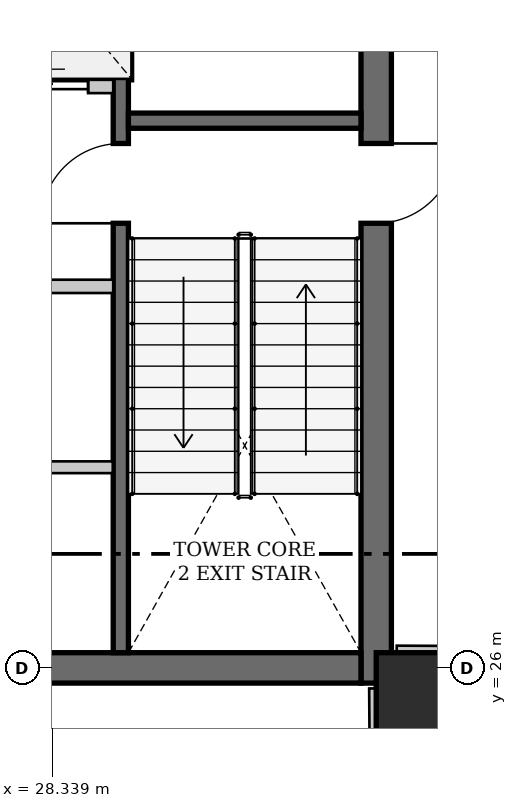
"""IFC4 building model, lengths in metres.
Left out: names, types, materials, properties, quantities, classifications, styles, units other than length and angle.
Written with IfcOpenShell. Run it as: python <this file> out.ifc"""

import sys

from ifc_helpers import new_model, si_unit, direction, frame, frame_2d, origin, origin_2d, place, context, subcontext, project, spatial, rectangle, extrude, source, transform, mapped, element, fill, save


model = new_model("IFC4")
c1 = context("Model", 3, precision=1e-05, world=origin(), true_north=direction((0.0, 1.0)))
c2 = subcontext(c1, "Body", "Model", "MODEL_VIEW")
j1 = project(units=[si_unit("LENGTHUNIT", "METRE"), si_unit("PLANEANGLEUNIT", "RADIAN")], contexts=[c1])
p1 = place(None, origin())
s1 = spatial("IfcSite", under=j1, at=p1, CompositionType="ELEMENT")
p2 = place(p1, origin())
s2 = spatial("IfcBuilding", under=s1, at=p2, CompositionType="ELEMENT")
p3 = place(p2, frame((0.0, 0.0, 84.8)))
s3 = spatial("IfcBuildingStorey", under=s2, at=p3, CompositionType="ELEMENT", Elevation=84.8)
p4 = place(p3, frame((33.3, 25.5, 0.0), z_axis=(0.0, 0.0, 1.0), x_axis=(1.0, 0.0, 0.0)))
e1 = element("IfcColumn", 1, at=p4, inside=s3, PredefinedType="COLUMN", context=c2, shape_type="SweptSolid", body=[
    extrude(rectangle(XDim=1.4, YDim=1.4, at=origin_2d()), origin(), (0.0, 0.0, 1.0), 4.15),
])
p5 = place(p3, frame((32.6, 36.6, 0.0), z_axis=(0.0, 0.0, 1.0), x_axis=(0.0, -1.0, 0.0)))
e2 = element("IfcWall", 2, at=p5, inside=s3, PredefinedType="SHEAR", context=c2, shape_type="SweptSolid", body=[
    extrude(rectangle(XDim=10.8, YDim=0.4, at=frame_2d((5.4, 0.0))), origin(), (0.0, 0.0, 1.0), 4.6),
])
p6 = place(p5, frame((3.7, 0.0, 0.0)))
e3 = element("IfcOpeningElement", 3, at=p6, cuts=e2, PredefinedType="OPENING", context=c2, shape_type="SweptSolid", body=[
    extrude(rectangle(XDim=1.05, YDim=2.15, at=frame_2d((0.525, 1.075))), frame((0.0, 0.21, 0.0), z_axis=(0.0, -1.0, 0.0), x_axis=(1.0, 0.0, 0.0)), (0.0, 0.0, 1.0), 0.42),
])
p7 = place(p3, frame((32.4, 26.0, 0.0), z_axis=(0.0, 0.0, 1.0), x_axis=(-1.0, 0.0, 0.0)))
e4 = element("IfcWall", 4, at=p7, inside=s3, PredefinedType="SHEAR", context=c2, shape_type="SweptSolid", body=[
    extrude(rectangle(XDim=12.8, YDim=0.4, at=frame_2d((6.4, 0.0))), origin(), (0.0, 0.0, 1.0), 4.6),
])
p8 = place(p7, frame((10.75, 0.0, 0.0)))
e5 = element("IfcOpeningElement", 5, at=p8, cuts=e4, PredefinedType="OPENING", context=c2, shape_type="SweptSolid", body=[
    extrude(rectangle(XDim=1.05, YDim=2.15, at=frame_2d((0.525, 1.075))), frame((0.0, 0.21, 0.0), z_axis=(0.0, -1.0, 0.0), x_axis=(1.0, 0.0, 0.0)), (0.0, 0.0, 1.0), 0.42),
])
p9 = place(p7, frame((5.67, 0.0, 0.0)))
e6 = element("IfcOpeningElement", 6, at=p9, cuts=e4, PredefinedType="OPENING", context=c2, shape_type="SweptSolid", body=[
    extrude(rectangle(XDim=1.45, YDim=2.2, at=frame_2d((0.725, 1.1))), frame((0.0, 0.21, 0.0), z_axis=(0.0, -1.0, 0.0), x_axis=(1.0, 0.0, 0.0)), (0.0, 0.0, 1.0), 0.42),
])
p10 = place(p3, frame((29.24, 26.2, 0.0), z_axis=(0.0, 0.0, 1.0), x_axis=(0.0, 1.0, 0.0)))
e7 = element("IfcWall", 7, at=p10, inside=s3, PredefinedType="SHEAR", context=c2, shape_type="SweptSolid", body=[
    extrude(rectangle(XDim=10.0, YDim=0.2, at=frame_2d((5.0, 0.0))), origin(), (0.0, 0.0, 1.0), 4.6),
])
p11 = place(p10, frame((5.65, 0.0, 0.0)))
e8 = element("IfcOpeningElement", 8, at=p11, cuts=e7, PredefinedType="OPENING", context=c2, shape_type="SweptSolid", body=[
    extrude(rectangle(XDim=1.05, YDim=2.15, at=frame_2d((0.525, 1.075))), frame((0.0, 0.11, 0.0), z_axis=(0.0, -1.0, 0.0), x_axis=(1.0, 0.0, 0.0)), (0.0, 0.0, 1.0), 0.22),
])
p12 = place(p3, frame((29.34, 33.2, 0.0), z_axis=(0.0, 0.0, 1.0), x_axis=(1.0, 0.0, 0.0)))
e9 = element("IfcWall", 9, at=p12, inside=s3, PredefinedType="SHEAR", context=c2, shape_type="SweptSolid", body=[
    extrude(rectangle(XDim=3.06, YDim=0.2, at=frame_2d((1.53, 0.0))), origin(), (0.0, 0.0, 1.0), 4.6),
])
p13 = place(p3, frame((22.86, 33.65, 0.0), z_axis=(0.0, 0.0, 1.0), x_axis=(1.0, 0.0, 0.0)))
e10 = element("IfcWall", 10, at=p13, inside=s3, PredefinedType="SOLIDWALL", context=c2, shape_type="SweptSolid", body=[
    extrude(rectangle(XDim=6.28, YDim=0.175, at=frame_2d((3.14, 0.0))), origin(), (0.0, 0.0, 1.0), 4.15),
])
p14 = place(p13, frame((0.5, 0.0, 0.0)))
e11 = element("IfcOpeningElement", 11, at=p14, cuts=e10, PredefinedType="OPENING", context=c2, shape_type="SweptSolid", body=[
    extrude(rectangle(XDim=1.05, YDim=2.15, at=frame_2d((0.525, 1.075))), frame((0.0, 0.098, 0.0), z_axis=(0.0, -1.0, 0.0), x_axis=(1.0, 0.0, 0.0)), (0.0, 0.0, 1.0), 0.195),
])
p15 = place(p13, frame((2.76, 0.0, 0.0)))
e12 = element("IfcOpeningElement", 12, at=p15, cuts=e10, PredefinedType="OPENING", context=c2, shape_type="SweptSolid", body=[
    extrude(rectangle(XDim=1.05, YDim=2.15, at=frame_2d((0.525, 1.075))), frame((0.0, 0.098, 0.0), z_axis=(0.0, -1.0, 0.0), x_axis=(1.0, 0.0, 0.0)), (0.0, 0.0, 1.0), 0.195),
])
p16 = place(p13, frame((4.9, 0.0, 0.0)))
e13 = element("IfcOpeningElement", 13, at=p16, cuts=e10, PredefinedType="OPENING", context=c2, shape_type="SweptSolid", body=[
    extrude(rectangle(XDim=1.05, YDim=2.15, at=frame_2d((0.525, 1.075))), frame((0.0, 0.098, 0.0), z_axis=(0.0, -1.0, 0.0), x_axis=(1.0, 0.0, 0.0)), (0.0, 0.0, 1.0), 0.195),
])
p17 = place(p3, frame((22.86, 31.02, 0.0), z_axis=(0.0, 0.0, 1.0), x_axis=(1.0, 0.0, 0.0)))
e14 = element("IfcWall", 14, at=p17, inside=s3, PredefinedType="SOLIDWALL", context=c2, shape_type="SweptSolid", body=[
    extrude(rectangle(XDim=6.28, YDim=0.175, at=frame_2d((3.14, 0.0))), origin(), (0.0, 0.0, 1.0), 4.15),
])
p18 = place(p3, frame((22.866, 28.64, 0.0), z_axis=(0.0, 0.0, 1.0), x_axis=(1.0, 0.0, 0.0)))
e15 = element("IfcWall", 15, at=p18, inside=s3, PredefinedType="PARTITIONING", context=c2, shape_type="SweptSolid", body=[
    extrude(rectangle(XDim=6.268, YDim=0.155, at=frame_2d((3.134, 0.0))), origin(), (0.0, 0.0, 1.0), 4.15),
])
p19 = place(p18, frame((2.7, 0.0, 0.0)))
e16 = element("IfcOpeningElement", 16, at=p19, cuts=e15, PredefinedType="OPENING", context=c2, shape_type="SweptSolid", body=[
    extrude(rectangle(XDim=0.9, YDim=2.1, at=frame_2d((0.45, 1.05))), frame((0.0, 0.087, 0.0), z_axis=(0.0, -1.0, 0.0), x_axis=(1.0, 0.0, 0.0)), (0.0, 0.0, 1.0), 0.175),
])
p20 = place(p3, frame((32.585, 25.73, 0.0), z_axis=(0.0, 0.0, 1.0), x_axis=(0.007253695172, -0.999973691607, 0.0)))
e17 = element("IfcWall", 17, at=p20, inside=s3, PredefinedType="PARTITIONING", context=c2, shape_type="SweptSolid", body=[
    extrude(rectangle(XDim=0.942, YDim=0.155, at=frame_2d((0.471, 0.0))), origin(), (0.0, 0.0, 1.0), 2.725),
])
p21 = place(p3, frame((33.928, 26.21, 0.0), z_axis=(0.0, 0.0, 1.0), x_axis=(-0.999988255797, 0.004846469737, 0.0)))
e18 = element("IfcWall", 18, at=p21, inside=s3, PredefinedType="PARTITIONING", context=c2, shape_type="SweptSolid", body=[
    extrude(rectangle(XDim=1.058, YDim=0.155, at=frame_2d((0.529, 0.0))), origin(), (0.0, 0.0, 1.0), 2.725),
])
m1 = source(origin(), c2, "Body", "SweptSolid", [
    extrude(rectangle(XDim=1.05, YDim=2.15, at=frame_2d((0.525, 1.075))), frame((0.0, 0.025, 0.0), z_axis=(0.0, -1.0, 0.0), x_axis=(1.0, 0.0, 0.0)), (0.0, 0.0, 1.0), 0.05),
])
p22 = place(p6, origin())
e19 = element("IfcDoor", 19, at=p22, inside=s3, OperationType="SINGLE_SWING_LEFT", PredefinedType="DOOR", context=c2, shape_type="MappedRepresentation", body=[
    mapped(m1, transform((0.0, 0.0, 0.0), x_axis=(1.0, 0.0, 0.0), y_axis=(0.0, 1.0, 0.0), z_axis=(0.0, 0.0, 1.0), scale=1.0)),
])
fill(e3, e19)
p23 = place(p11, origin())
e20 = element("IfcDoor", 20, at=p23, inside=s3, OperationType="SINGLE_SWING_LEFT", PredefinedType="DOOR", context=c2, shape_type="MappedRepresentation", body=[
    mapped(m1, transform((0.0, 0.0, 0.0), x_axis=(1.0, 0.0, 0.0), y_axis=(0.0, 1.0, 0.0), z_axis=(0.0, 0.0, 1.0), scale=1.0)),
])
fill(e8, e20)
m2 = source(origin(), c2, "Body", "SweptSolid", [
    extrude(rectangle(XDim=1.05, YDim=2.15, at=frame_2d((0.525, 1.075))), frame((0.0, 0.025, 0.0), z_axis=(0.0, -1.0, 0.0), x_axis=(1.0, 0.0, 0.0)), (0.0, 0.0, 1.0), 0.05),
])
p24 = place(p16, origin())
e21 = element("IfcDoor", 21, at=p24, inside=s3, OperationType="SLIDING_TO_LEFT", PredefinedType="DOOR", context=c2, shape_type="MappedRepresentation", body=[
    mapped(m2, transform((0.0, 0.0, 0.0), x_axis=(1.0, 0.0, 0.0), y_axis=(0.0, 1.0, 0.0), z_axis=(0.0, 0.0, 1.0), scale=1.0)),
])
fill(e13, e21)
save(model, sys.argv[1])
